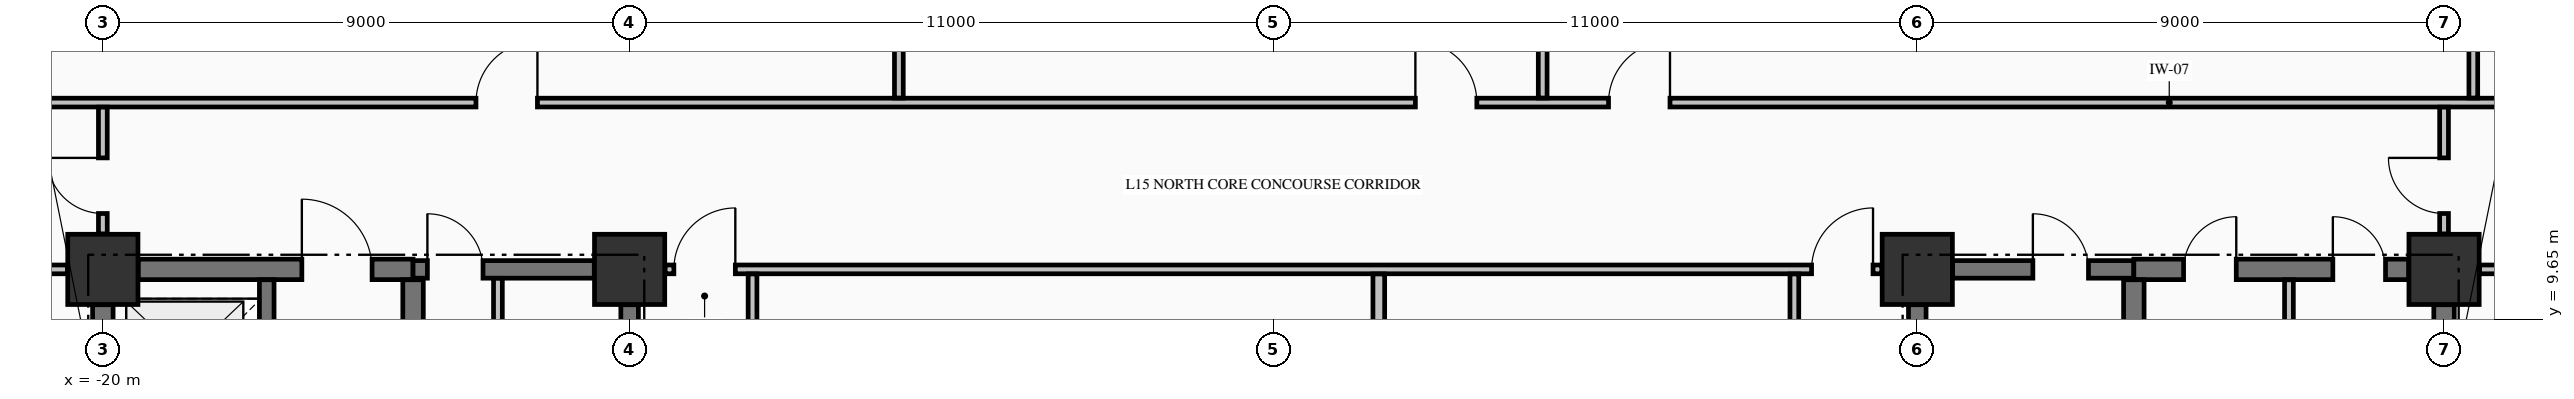
"""IFC4 building model, lengths in metres.
Left out: names, types, materials, properties, quantities, classifications, styles, units other than length and angle.
Written with IfcOpenShell. Run it as: python <this file> out.ifc"""

import sys

from ifc_helpers import new_model, si_unit, direction, frame, frame_2d, origin, origin_2d, place, context, subcontext, project, spatial, rectangle, extrude, element, fill, save


model = new_model("IFC4")
c1 = context("Model", 3, precision=1e-05, world=origin(), true_north=direction((0.0, 1.0)))
c2 = subcontext(c1, "Body", "Model", "MODEL_VIEW")
j1 = project(units=[si_unit("LENGTHUNIT", "METRE"), si_unit("PLANEANGLEUNIT", "RADIAN")], contexts=[c1])
p1 = place(None, origin())
s1 = spatial("IfcSite", under=j1, at=p1, CompositionType="ELEMENT")
p2 = place(p1, origin())
s2 = spatial("IfcBuilding", under=s1, at=p2, CompositionType="ELEMENT")
p3 = place(p2, frame((0.0, 0.0, 64.33)))
s3 = spatial("IfcBuildingStorey", under=s2, at=p3, CompositionType="ELEMENT", Elevation=64.33)
for number, where, z_axis, x_axis in (
    (1, (-20.0, 10.5, -0.25), (0.0, 0.0, 1.0), (1.0, 0.0, 0.0)),
    (2, (-11.0, 10.5, -0.25), (0.0, 0.0, 1.0), (1.0, 0.0, 0.0)),
    (3, (11.0, 10.5, -0.25), (0.0, 0.0, 1.0), (1.0, 0.0, 0.0)),
    (4, (20.0, 10.5, -0.25), (0.0, 0.0, 1.0), (1.0, 0.0, 0.0)),
):
    element("IfcColumn", number, at=place(p3, frame(where, z_axis=z_axis, x_axis=x_axis)), inside=s3, PredefinedType="COLUMN", context=c2, shape_type="SweptSolid", body=[
        extrude(rectangle(XDim=1.2, YDim=1.2, at=origin_2d()), origin(), (0.0, 0.0, 1.0), 3.57),
    ])
p4 = place(p3, frame((-19.396, 10.5, 0.0), z_axis=(0.0, 0.0, 1.0), x_axis=(1.0, 0.0, 0.0)))
e5 = element("IfcWall", 5, at=p4, inside=s3, PredefinedType="SHEAR", context=c2, shape_type="SweptSolid", body=[
    extrude(rectangle(XDim=4.696, YDim=0.35, at=frame_2d((2.348, 0.0))), origin(), (0.0, 0.0, 1.0), 3.32),
])
p5 = place(p4, frame((2.796, 0.0, 0.0)))
e6 = element("IfcOpeningElement", 6, at=p5, cuts=e5, PredefinedType="OPENING", context=c2, shape_type="SweptSolid", body=[
    extrude(rectangle(XDim=1.2, YDim=2.15, at=frame_2d((0.6, 1.075))), frame((0.0, 0.185, 0.0), z_axis=(0.0, -1.0, 0.0), x_axis=(1.0, 0.0, 0.0)), (0.0, 0.0, 1.0), 0.37),
])
p6 = place(p3, frame((-14.7, 10.5, 0.0), z_axis=(0.0, 0.0, 1.0), x_axis=(1.0, 0.0, 0.0)))
e7 = element("IfcWall", 7, at=p6, inside=s3, PredefinedType="SHEAR", context=c2, shape_type="SweptSolid", body=[
    extrude(rectangle(XDim=3.096, YDim=0.3, at=frame_2d((1.548, 0.0))), origin(), (0.0, 0.0, 1.0), 3.32),
])
p7 = place(p6, frame((0.245, 0.0, 0.0)))
e8 = element("IfcOpeningElement", 8, at=p7, cuts=e7, PredefinedType="OPENING", context=c2, shape_type="SweptSolid", body=[
    extrude(rectangle(XDim=0.95, YDim=2.15, at=frame_2d((0.475, 1.075))), frame((0.0, 0.16, 0.0), z_axis=(0.0, -1.0, 0.0), x_axis=(1.0, 0.0, 0.0)), (0.0, 0.0, 1.0), 0.32),
])
p8 = place(p3, frame((11.604, 10.5, 0.0), z_axis=(0.0, 0.0, 1.0), x_axis=(1.0, 0.0, 0.0)))
e9 = element("IfcWall", 9, at=p8, inside=s3, PredefinedType="SHEAR", context=c2, shape_type="SweptSolid", body=[
    extrude(rectangle(XDim=3.096, YDim=0.3, at=frame_2d((1.548, 0.0))), origin(), (0.0, 0.0, 1.0), 3.32),
])
p9 = place(p8, frame((1.371, 0.0, 0.0)))
e10 = element("IfcOpeningElement", 10, at=p9, cuts=e9, PredefinedType="OPENING", context=c2, shape_type="SweptSolid", body=[
    extrude(rectangle(XDim=0.95, YDim=2.15, at=frame_2d((0.475, 1.075))), frame((0.0, 0.16, 0.0), z_axis=(0.0, -1.0, 0.0), x_axis=(1.0, 0.0, 0.0)), (0.0, 0.0, 1.0), 0.32),
])
p10 = place(p3, frame((14.7, 10.5, 0.0), z_axis=(0.0, 0.0, 1.0), x_axis=(1.0, 0.0, 0.0)))
e11 = element("IfcWall", 11, at=p10, inside=s3, PredefinedType="SHEAR", context=c2, shape_type="SweptSolid", body=[
    extrude(rectangle(XDim=4.696, YDim=0.35, at=frame_2d((2.348, 0.0))), origin(), (0.0, 0.0, 1.0), 3.32),
])
p11 = place(p10, frame((0.85, 0.0, 0.0)))
e12 = element("IfcOpeningElement", 12, at=p11, cuts=e11, PredefinedType="OPENING", context=c2, shape_type="SweptSolid", body=[
    extrude(rectangle(XDim=0.9, YDim=2.15, at=frame_2d((0.45, 1.075))), frame((0.0, 0.185, 0.0), z_axis=(0.0, -1.0, 0.0), x_axis=(1.0, 0.0, 0.0)), (0.0, 0.0, 1.0), 0.37),
])
p12 = place(p10, frame((3.4, 0.0, 0.0)))
e13 = element("IfcOpeningElement", 13, at=p12, cuts=e11, PredefinedType="OPENING", context=c2, shape_type="SweptSolid", body=[
    extrude(rectangle(XDim=0.9, YDim=2.15, at=frame_2d((0.45, 1.075))), frame((0.0, 0.185, 0.0), z_axis=(0.0, -1.0, 0.0), x_axis=(1.0, 0.0, 0.0)), (0.0, 0.0, 1.0), 0.37),
])
p13 = place(p3, frame((-28.835, 10.5, 0.0), z_axis=(0.0, 0.0, 1.0), x_axis=(1.0, 0.0, 0.0)))
e14 = element("IfcWall", 14, at=p13, inside=s3, PredefinedType="PARTITIONING", context=c2, shape_type="SweptSolid", body=[
    extrude(rectangle(XDim=8.229, YDim=0.15, at=frame_2d((4.115, 0.0))), origin(), (0.0, 0.0, 1.0), 3.32),
])
p14 = place(p13, frame((3.86, 0.0, 0.0)))
e15 = element("IfcOpeningElement", 15, at=p14, cuts=e14, PredefinedType="OPENING", context=c2, shape_type="SweptSolid", body=[
    extrude(rectangle(XDim=0.95, YDim=2.15, at=frame_2d((0.475, 1.075))), frame((0.0, 0.085, 0.0), z_axis=(0.0, -1.0, 0.0), x_axis=(1.0, 0.0, 0.0)), (0.0, 0.0, 1.0), 0.17),
])
p15 = place(p3, frame((-10.394, 10.5, 0.0), z_axis=(0.0, 0.0, 1.0), x_axis=(1.0, 0.0, 0.0)))
e16 = element("IfcWall", 16, at=p15, inside=s3, PredefinedType="PARTITIONING", context=c2, shape_type="SweptSolid", body=[
    extrude(rectangle(XDim=20.788, YDim=0.15, at=frame_2d((10.394, 0.0))), origin(), (0.0, 0.0, 1.0), 3.32),
])
p16 = place(p15, frame((0.15, 0.0, 0.0)))
e17 = element("IfcOpeningElement", 17, at=p16, cuts=e16, PredefinedType="OPENING", context=c2, shape_type="SweptSolid", body=[
    extrude(rectangle(XDim=1.05, YDim=2.15, at=frame_2d((0.525, 1.075))), frame((0.0, 0.085, 0.0), z_axis=(0.0, -1.0, 0.0), x_axis=(1.0, 0.0, 0.0)), (0.0, 0.0, 1.0), 0.17),
])
p17 = place(p15, frame((19.588, 0.0, 0.0)))
e18 = element("IfcOpeningElement", 18, at=p17, cuts=e16, PredefinedType="OPENING", context=c2, shape_type="SweptSolid", body=[
    extrude(rectangle(XDim=1.05, YDim=2.15, at=frame_2d((0.525, 1.075))), frame((0.0, 0.085, 0.0), z_axis=(0.0, -1.0, 0.0), x_axis=(1.0, 0.0, 0.0)), (0.0, 0.0, 1.0), 0.17),
])
p18 = place(p3, frame((20.606, 10.5, 0.0), z_axis=(0.0, 0.0, 1.0), x_axis=(1.0, 0.0, 0.0)))
e19 = element("IfcWall", 19, at=p18, inside=s3, PredefinedType="PARTITIONING", context=c2, shape_type="SweptSolid", body=[
    extrude(rectangle(XDim=3.229, YDim=0.15, at=frame_2d((1.615, 0.0))), origin(), (0.0, 0.0, 1.0), 3.32),
])
p19 = place(p18, frame((0.894, 0.0, 0.0)))
e20 = element("IfcOpeningElement", 20, at=p19, cuts=e19, PredefinedType="OPENING", context=c2, shape_type="SweptSolid", body=[
    extrude(rectangle(XDim=1.0, YDim=2.15, at=frame_2d((0.5, 1.075))), frame((0.0, 0.085, 0.0), z_axis=(0.0, -1.0, 0.0), x_axis=(1.0, 0.0, 0.0)), (0.0, 0.0, 1.0), 0.17),
])
p20 = place(p3, frame((-28.835, 13.35, 0.0), z_axis=(0.0, 0.0, 1.0), x_axis=(1.0, 0.0, 0.0)))
e21 = element("IfcWall", 21, at=p20, inside=s3, PredefinedType="PARTITIONING", context=c2, shape_type="SweptSolid", body=[
    extrude(rectangle(XDim=52.67, YDim=0.15, at=frame_2d((26.335, 0.0))), origin(), (0.0, 0.0, 1.0), 3.32),
])
p21 = place(p20, frame((15.21, 0.0, 0.0)))
e22 = element("IfcOpeningElement", 22, at=p21, cuts=e21, PredefinedType="OPENING", context=c2, shape_type="SweptSolid", body=[
    extrude(rectangle(XDim=1.05, YDim=2.15, at=frame_2d((0.525, 1.075))), frame((0.0, 0.085, 0.0), z_axis=(0.0, -1.0, 0.0), x_axis=(1.0, 0.0, 0.0)), (0.0, 0.0, 1.0), 0.17),
])
p22 = place(p20, frame((31.26, 0.0, 0.0)))
e23 = element("IfcOpeningElement", 23, at=p22, cuts=e21, PredefinedType="OPENING", context=c2, shape_type="SweptSolid", body=[
    extrude(rectangle(XDim=1.05, YDim=2.15, at=frame_2d((0.525, 1.075))), frame((0.0, 0.085, 0.0), z_axis=(0.0, -1.0, 0.0), x_axis=(1.0, 0.0, 0.0)), (0.0, 0.0, 1.0), 0.17),
])
p23 = place(p20, frame((34.56, 0.0, 0.0)))
e24 = element("IfcOpeningElement", 24, at=p23, cuts=e21, PredefinedType="OPENING", context=c2, shape_type="SweptSolid", body=[
    extrude(rectangle(XDim=1.05, YDim=2.15, at=frame_2d((0.525, 1.075))), frame((0.0, 0.085, 0.0), z_axis=(0.0, -1.0, 0.0), x_axis=(1.0, 0.0, 0.0)), (0.0, 0.0, 1.0), 0.17),
])
p24 = place(p3, frame((-20.0, 7.727, 0.0), z_axis=(0.0, 0.0, 1.0), x_axis=(0.0, 1.0, 0.0)))
e25 = element("IfcWall", 25, at=p24, inside=s3, PredefinedType="SHEAR", context=c2, shape_type="SweptSolid", body=[
    extrude(rectangle(XDim=2.169, YDim=0.35, at=frame_2d((1.084, 0.0))), origin(), (0.0, 0.0, 1.0), 3.32),
])
p25 = place(p3, frame((-17.2, 7.727, 0.0), z_axis=(0.0, 0.0, 1.0), x_axis=(0.0, 1.0, 0.0)))
e26 = element("IfcWall", 26, at=p25, inside=s3, PredefinedType="SOLIDWALL", context=c2, shape_type="SweptSolid", body=[
    extrude(rectangle(XDim=2.596, YDim=0.25, at=frame_2d((1.298, 0.0))), origin(), (0.0, 0.0, 1.0), 3.32),
])
p26 = place(p25, frame((0.773, 0.0, 0.0)))
e27 = element("IfcOpeningElement", 27, at=p26, cuts=e26, PredefinedType="OPENING", context=c2, shape_type="SweptSolid", body=[
    extrude(rectangle(XDim=1.1, YDim=2.2, at=frame_2d((0.55, 1.1))), frame((0.0, 0.135, 0.0), z_axis=(0.0, -1.0, 0.0), x_axis=(1.0, 0.0, 0.0)), (0.0, 0.0, 1.0), 0.27),
])
p27 = place(p3, frame((-14.7, 5.852, 0.0), z_axis=(0.0, 0.0, 1.0), x_axis=(0.0, 1.0, 0.0)))
e28 = element("IfcWall", 28, at=p27, inside=s3, PredefinedType="SHEAR", context=c2, shape_type="SweptSolid", body=[
    extrude(rectangle(XDim=4.471, YDim=0.35, at=frame_2d((2.235, 0.0))), origin(), (0.0, 0.0, 1.0), 3.32),
])
for number, where, z_axis, x_axis in (
    (29, (-11.0, 5.852, 0.0), (0.0, 0.0, 1.0), (0.0, 1.0, 0.0)),
    (30, (11.0, 5.852, 0.0), (0.0, 0.0, 1.0), (0.0, 1.0, 0.0)),
):
    element("IfcWall", number, at=place(p3, frame(where, z_axis=z_axis, x_axis=x_axis)), inside=s3, PredefinedType="SHEAR", context=c2, shape_type="SweptSolid", body=[
        extrude(rectangle(XDim=4.044, YDim=0.3, at=frame_2d((2.022, 0.0))), origin(), (0.0, 0.0, 1.0), 3.32),
    ])
p28 = place(p3, frame((14.7, 5.852, 0.0), z_axis=(0.0, 0.0, 1.0), x_axis=(0.0, 1.0, 0.0)))
e31 = element("IfcWall", 31, at=p28, inside=s3, PredefinedType="SHEAR", context=c2, shape_type="SweptSolid", body=[
    extrude(rectangle(XDim=4.471, YDim=0.35, at=frame_2d((2.235, 0.0))), origin(), (0.0, 0.0, 1.0), 3.32),
])
p29 = place(p3, frame((20.0, 0.604, 0.0), z_axis=(0.0, 0.0, 1.0), x_axis=(0.0, 1.0, 0.0)))
e32 = element("IfcWall", 32, at=p29, inside=s3, PredefinedType="SHEAR", context=c2, shape_type="SweptSolid", body=[
    extrude(rectangle(XDim=9.292, YDim=0.35, at=frame_2d((4.646, 0.0))), origin(), (0.0, 0.0, 1.0), 3.32),
])
p30 = place(p3, frame((-20.0, 11.106, 0.0), z_axis=(0.0, 0.0, 1.0), x_axis=(0.0, 1.0, 0.0)))
e33 = element("IfcWall", 33, at=p30, inside=s3, PredefinedType="PARTITIONING", context=c2, shape_type="SweptSolid", body=[
    extrude(rectangle(XDim=2.166, YDim=0.15, at=frame_2d((1.083, 0.0))), origin(), (0.0, 0.0, 1.0), 2.66),
])
p31 = place(p30, frame((0.349, 0.0, 0.0)))
e34 = element("IfcOpeningElement", 34, at=p31, cuts=e33, PredefinedType="OPENING", context=c2, shape_type="SweptSolid", body=[
    extrude(rectangle(XDim=0.95, YDim=2.15, at=frame_2d((0.475, 1.075))), frame((0.0, 0.085, 0.0), z_axis=(0.0, -1.0, 0.0), x_axis=(1.0, 0.0, 0.0)), (0.0, 0.0, 1.0), 0.17),
])
p32 = place(p3, frame((-13.25, 5.853, 0.0), z_axis=(0.0, 0.0, 1.0), x_axis=(0.0, 1.0, 0.0)))
e35 = element("IfcWall", 35, at=p32, inside=s3, PredefinedType="PARTITIONING", context=c2, shape_type="SweptSolid", body=[
    extrude(rectangle(XDim=4.494, YDim=0.15, at=frame_2d((2.247, 0.0))), origin(), (0.0, 0.0, 1.0), 3.32),
])
p33 = place(p32, frame((1.472, 0.0, 0.0)))
e36 = element("IfcOpeningElement", 36, at=p33, cuts=e35, PredefinedType="OPENING", context=c2, shape_type="SweptSolid", body=[
    extrude(rectangle(XDim=0.95, YDim=2.15, at=frame_2d((0.475, 1.075))), frame((0.0, 0.085, 0.0), z_axis=(0.0, -1.0, 0.0), x_axis=(1.0, 0.0, 0.0)), (0.0, 0.0, 1.0), 0.17),
])
p34 = place(p3, frame((-8.9, 2.303, 0.0), z_axis=(0.0, 0.0, 1.0), x_axis=(0.0, 1.0, 0.0)))
e37 = element("IfcWall", 37, at=p34, inside=s3, PredefinedType="PARTITIONING", context=c2, shape_type="SweptSolid", body=[
    extrude(rectangle(XDim=8.119, YDim=0.15, at=frame_2d((4.06, 0.0))), origin(), (0.0, 0.0, 1.0), 3.32),
])
p35 = place(p34, frame((3.522, 0.0, 0.0)))
e38 = element("IfcOpeningElement", 38, at=p35, cuts=e37, PredefinedType="OPENING", context=c2, shape_type="SweptSolid", body=[
    extrude(rectangle(XDim=1.05, YDim=2.15, at=frame_2d((0.525, 1.075))), frame((0.0, 0.085, 0.0), z_axis=(0.0, -1.0, 0.0), x_axis=(1.0, 0.0, 0.0)), (0.0, 0.0, 1.0), 0.17),
])
p36 = place(p3, frame((-6.4, 13.428, 0.0), z_axis=(0.0, 0.0, 1.0), x_axis=(0.0, 1.0, 0.0)))
e39 = element("IfcWall", 39, at=p36, inside=s3, PredefinedType="PARTITIONING", context=c2, shape_type="SweptSolid", body=[
    extrude(rectangle(XDim=12.907, YDim=0.15, at=frame_2d((6.454, 0.0))), origin(), (0.0, 0.0, 1.0), 3.32),
])
p37 = place(p3, frame((1.8, 2.303, 0.0), z_axis=(0.0, 0.0, 1.0), x_axis=(0.0, 1.0, 0.0)))
e40 = element("IfcWall", 40, at=p37, inside=s3, PredefinedType="PARTITIONING", context=c2, shape_type="SweptSolid", body=[
    extrude(rectangle(XDim=8.119, YDim=0.2, at=frame_2d((4.06, 0.0))), origin(), (0.0, 0.0, 1.0), 3.32),
])
p38 = place(p3, frame((4.6, 13.428, 0.0), z_axis=(0.0, 0.0, 1.0), x_axis=(0.0, 1.0, 0.0)))
e41 = element("IfcWall", 41, at=p38, inside=s3, PredefinedType="PARTITIONING", context=c2, shape_type="SweptSolid", body=[
    extrude(rectangle(XDim=12.907, YDim=0.15, at=frame_2d((6.454, 0.0))), origin(), (0.0, 0.0, 1.0), 3.32),
])
p39 = place(p3, frame((8.9, -1.097, 0.0), z_axis=(0.0, 0.0, 1.0), x_axis=(0.0, 1.0, 0.0)))
e42 = element("IfcWall", 42, at=p39, inside=s3, PredefinedType="PARTITIONING", context=c2, shape_type="SweptSolid", body=[
    extrude(rectangle(XDim=11.519, YDim=0.15, at=frame_2d((5.76, 0.0))), origin(), (0.0, 0.0, 1.0), 3.32),
])
p40 = place(p39, frame((5.197, 0.0, 0.0)))
e43 = element("IfcOpeningElement", 43, at=p40, cuts=e42, PredefinedType="OPENING", context=c2, shape_type="SweptSolid", body=[
    extrude(rectangle(XDim=1.1, YDim=2.15, at=frame_2d((0.55, 1.075))), frame((0.0, 0.085, 0.0), z_axis=(0.0, -1.0, 0.0), x_axis=(1.0, 0.0, 0.0)), (0.0, 0.0, 1.0), 0.17),
])
p41 = place(p3, frame((17.35, -4.422, 0.0), z_axis=(0.0, 0.0, 1.0), x_axis=(0.0, 1.0, 0.0)))
e44 = element("IfcWall", 44, at=p41, inside=s3, PredefinedType="PARTITIONING", context=c2, shape_type="SweptSolid", body=[
    extrude(rectangle(XDim=14.744, YDim=0.15, at=frame_2d((7.372, 0.0))), origin(), (0.0, 0.0, 1.0), 3.32),
])
p42 = place(p3, frame((20.0, 11.106, 0.0), z_axis=(0.0, 0.0, 1.0), x_axis=(0.0, 1.0, 0.0)))
e45 = element("IfcWall", 45, at=p42, inside=s3, PredefinedType="PARTITIONING", context=c2, shape_type="SweptSolid", body=[
    extrude(rectangle(XDim=2.166, YDim=0.15, at=frame_2d((1.083, 0.0))), origin(), (0.0, 0.0, 1.0), 3.32),
])
p43 = place(p42, frame((0.349, 0.0, 0.0)))
e46 = element("IfcOpeningElement", 46, at=p43, cuts=e45, PredefinedType="OPENING", context=c2, shape_type="SweptSolid", body=[
    extrude(rectangle(XDim=0.95, YDim=2.15, at=frame_2d((0.475, 1.075))), frame((0.0, 0.085, 0.0), z_axis=(0.0, -1.0, 0.0), x_axis=(1.0, 0.0, 0.0)), (0.0, 0.0, 1.0), 0.17),
])
p44 = place(p3, frame((20.5, 13.428, 0.0), z_axis=(0.0, 0.0, 1.0), x_axis=(0.0, 1.0, 0.0)))
e47 = element("IfcWall", 47, at=p44, inside=s3, PredefinedType="PARTITIONING", context=c2, shape_type="SweptSolid", body=[
    extrude(rectangle(XDim=8.866, YDim=0.15, at=frame_2d((4.433, 0.0))), origin(), (0.0, 0.0, 1.0), 3.32),
])
p45 = place(p7, origin())
e48 = element("IfcDoor", 48, at=p45, inside=s3, OperationType="SINGLE_SWING_LEFT", PredefinedType="DOOR", context=c2, shape_type="SweptSolid", body=[
    extrude(rectangle(XDim=0.95, YDim=2.15, at=frame_2d((0.475, 1.075))), frame((0.0, 0.025, 0.0), z_axis=(0.0, -1.0, 0.0), x_axis=(1.0, 0.0, 0.0)), (0.0, 0.0, 1.0), 0.05),
])
fill(e8, e48)
p46 = place(p9, origin())
e49 = element("IfcDoor", 49, at=p46, inside=s3, OperationType="SINGLE_SWING_LEFT", PredefinedType="DOOR", context=c2, shape_type="SweptSolid", body=[
    extrude(rectangle(XDim=0.95, YDim=2.15, at=frame_2d((0.475, 1.075))), frame((0.0, 0.025, 0.0), z_axis=(0.0, -1.0, 0.0), x_axis=(1.0, 0.0, 0.0)), (0.0, 0.0, 1.0), 0.05),
])
fill(e10, e49)
p47 = place(p5, origin())
e50 = element("IfcDoor", 50, at=p47, inside=s3, OperationType="SINGLE_SWING_LEFT", PredefinedType="DOOR", context=c2, shape_type="SweptSolid", body=[
    extrude(rectangle(XDim=1.2, YDim=2.15, at=frame_2d((0.6, 1.075))), frame((0.0, 0.025, 0.0), z_axis=(0.0, -1.0, 0.0), x_axis=(1.0, 0.0, 0.0)), (0.0, 0.0, 1.0), 0.05),
])
fill(e6, e50)
p48 = place(p11, origin())
e51 = element("IfcDoor", 51, at=p48, inside=s3, OperationType="SINGLE_SWING_RIGHT", PredefinedType="DOOR", context=c2, shape_type="SweptSolid", body=[
    extrude(rectangle(XDim=0.9, YDim=2.15, at=frame_2d((0.45, 1.075))), frame((0.0, 0.025, 0.0), z_axis=(0.0, -1.0, 0.0), x_axis=(1.0, 0.0, 0.0)), (0.0, 0.0, 1.0), 0.05),
])
fill(e12, e51)
p49 = place(p12, origin())
e52 = element("IfcDoor", 52, at=p49, inside=s3, OperationType="SINGLE_SWING_LEFT", PredefinedType="DOOR", context=c2, shape_type="SweptSolid", body=[
    extrude(rectangle(XDim=0.9, YDim=2.15, at=frame_2d((0.45, 1.075))), frame((0.0, 0.025, 0.0), z_axis=(0.0, -1.0, 0.0), x_axis=(1.0, 0.0, 0.0)), (0.0, 0.0, 1.0), 0.05),
])
fill(e13, e52)
p50 = place(p16, origin())
e53 = element("IfcDoor", 53, at=p50, inside=s3, OperationType="SINGLE_SWING_RIGHT", PredefinedType="DOOR", context=c2, shape_type="SweptSolid", body=[
    extrude(rectangle(XDim=1.05, YDim=2.15, at=frame_2d((0.525, 1.075))), frame((0.0, 0.025, 0.0), z_axis=(0.0, -1.0, 0.0), x_axis=(1.0, 0.0, 0.0)), (0.0, 0.0, 1.0), 0.05),
])
fill(e17, e53)
p51 = place(p17, origin())
e54 = element("IfcDoor", 54, at=p51, inside=s3, OperationType="SINGLE_SWING_RIGHT", PredefinedType="DOOR", context=c2, shape_type="SweptSolid", body=[
    extrude(rectangle(XDim=1.05, YDim=2.15, at=frame_2d((0.525, 1.075))), frame((0.0, 0.025, 0.0), z_axis=(0.0, -1.0, 0.0), x_axis=(1.0, 0.0, 0.0)), (0.0, 0.0, 1.0), 0.05),
])
fill(e18, e54)
p52 = place(p21, origin())
e55 = element("IfcDoor", 55, at=p52, inside=s3, OperationType="SINGLE_SWING_RIGHT", PredefinedType="DOOR", context=c2, shape_type="SweptSolid", body=[
    extrude(rectangle(XDim=1.05, YDim=2.15, at=frame_2d((0.525, 1.075))), frame((0.0, 0.025, 0.0), z_axis=(0.0, -1.0, 0.0), x_axis=(1.0, 0.0, 0.0)), (0.0, 0.0, 1.0), 0.05),
])
fill(e22, e55)
p53 = place(p22, origin())
e56 = element("IfcDoor", 56, at=p53, inside=s3, OperationType="SINGLE_SWING_LEFT", PredefinedType="DOOR", context=c2, shape_type="SweptSolid", body=[
    extrude(rectangle(XDim=1.05, YDim=2.15, at=frame_2d((0.525, 1.075))), frame((0.0, 0.025, 0.0), z_axis=(0.0, -1.0, 0.0), x_axis=(1.0, 0.0, 0.0)), (0.0, 0.0, 1.0), 0.05),
])
fill(e23, e56)
p54 = place(p23, origin())
e57 = element("IfcDoor", 57, at=p54, inside=s3, OperationType="SINGLE_SWING_RIGHT", PredefinedType="DOOR", context=c2, shape_type="SweptSolid", body=[
    extrude(rectangle(XDim=1.05, YDim=2.15, at=frame_2d((0.525, 1.075))), frame((0.0, 0.025, 0.0), z_axis=(0.0, -1.0, 0.0), x_axis=(1.0, 0.0, 0.0)), (0.0, 0.0, 1.0), 0.05),
])
fill(e24, e57)
p55 = place(p31, origin())
e58 = element("IfcDoor", 58, at=p55, inside=s3, OperationType="SINGLE_SWING_RIGHT", PredefinedType="DOOR", context=c2, shape_type="SweptSolid", body=[
    extrude(rectangle(XDim=0.95, YDim=2.15, at=frame_2d((0.475, 1.075))), frame((0.0, 0.025, 0.0), z_axis=(0.0, -1.0, 0.0), x_axis=(1.0, 0.0, 0.0)), (0.0, 0.0, 1.0), 0.05),
])
fill(e34, e58)
p56 = place(p43, origin())
e59 = element("IfcDoor", 59, at=p56, inside=s3, OperationType="SINGLE_SWING_RIGHT", PredefinedType="DOOR", context=c2, shape_type="SweptSolid", body=[
    extrude(rectangle(XDim=0.95, YDim=2.15, at=frame_2d((0.475, 1.075))), frame((0.0, 0.025, 0.0), z_axis=(0.0, -1.0, 0.0), x_axis=(1.0, 0.0, 0.0)), (0.0, 0.0, 1.0), 0.05),
])
fill(e46, e59)
save(model, sys.argv[1])
